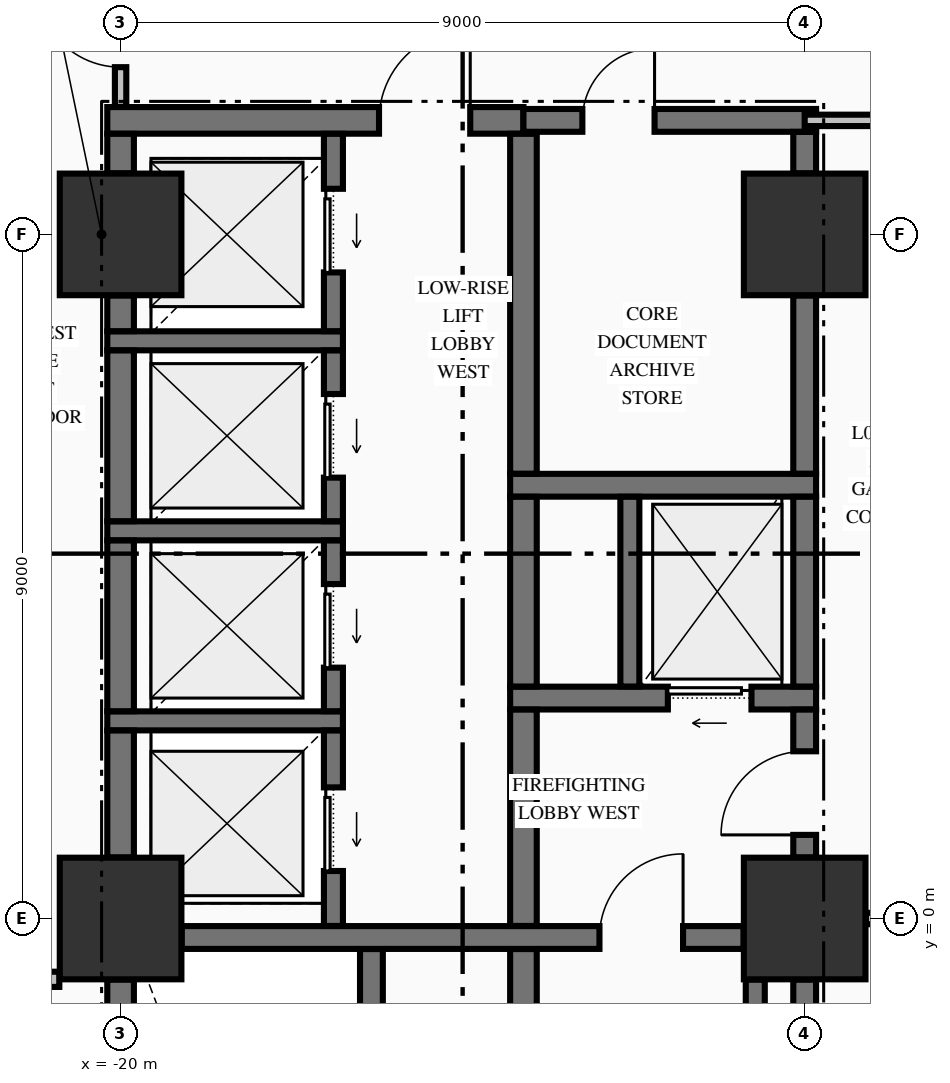
"""IFC4 building model, lengths in metres.
Left out: names, types, materials, properties, quantities, classifications, styles, units other than length and angle.
Written with IfcOpenShell. Run it as: python <this file> out.ifc"""

import sys

from ifc_helpers import new_model, si_unit, direction, frame, frame_2d, origin, origin_2d, place, context, subcontext, project, spatial, rectangle, extrude, element, fill, save


model = new_model("IFC4")
c1 = context("Model", 3, precision=1e-05, world=origin(), true_north=direction((0.0, 1.0)))
c2 = subcontext(c1, "Body", "Model", "MODEL_VIEW")
j1 = project(units=[si_unit("LENGTHUNIT", "METRE"), si_unit("PLANEANGLEUNIT", "RADIAN")], contexts=[c1])
p1 = place(None, origin())
s1 = spatial("IfcSite", under=j1, at=p1, CompositionType="ELEMENT")
p2 = place(p1, origin())
s2 = spatial("IfcBuilding", under=s1, at=p2, CompositionType="ELEMENT")
p3 = place(p2, origin())
s3 = spatial("IfcBuildingStorey", under=s2, at=p3, CompositionType="ELEMENT", Elevation=0.0)
for number, where, z_axis, x_axis in (
    (1, (-20.0, 0.0, 0.0), (0.0, 0.0, 1.0), (1.0, 0.0, 0.0)),
    (2, (-20.0, 9.0, 0.0), (0.0, 0.0, 1.0), (1.0, 0.0, 0.0)),
    (3, (-11.0, 0.0, 0.0), (0.0, 0.0, 1.0), (1.0, 0.0, 0.0)),
    (4, (-11.0, 9.0, 0.0), (0.0, 0.0, 1.0), (1.0, 0.0, 0.0)),
):
    element("IfcColumn", number, at=place(p3, frame(where, z_axis=z_axis, x_axis=x_axis)), inside=s3, PredefinedType="COLUMN", context=c2, shape_type="SweptSolid", body=[
        extrude(rectangle(XDim=1.6, YDim=1.6, at=origin_2d()), origin(), (0.0, 0.0, 1.0), 5.09),
    ])
p4 = place(p3, frame((-19.196, -0.25, 0.0), z_axis=(0.0, 0.0, 1.0), x_axis=(1.0, 0.0, 0.0)))
e5 = element("IfcWall", 5, at=p4, inside=s3, PredefinedType="SHEAR", context=c2, shape_type="SweptSolid", body=[
    extrude(rectangle(XDim=7.392, YDim=0.3, at=frame_2d((3.696, 0.0))), origin(), (0.0, 0.0, 1.0), 5.09),
])
p5 = place(p4, frame((5.496, 0.0, 0.0)))
e6 = element("IfcOpeningElement", 6, at=p5, cuts=e5, PredefinedType="OPENING", context=c2, shape_type="SweptSolid", body=[
    extrude(rectangle(XDim=1.1, YDim=2.15, at=frame_2d((0.55, 1.075))), frame((0.0, 0.16, 0.0), z_axis=(0.0, -1.0, 0.0), x_axis=(1.0, 0.0, 0.0)), (0.0, 0.0, 1.0), 0.32),
])
p6 = place(p3, frame((-20.175, 2.6, 0.0), z_axis=(0.0, 0.0, 1.0), x_axis=(1.0, 0.0, 0.0)))
e7 = element("IfcWall", 7, at=p6, inside=s3, PredefinedType="SOLIDWALL", context=c2, shape_type="SweptSolid", body=[
    extrude(rectangle(XDim=3.1, YDim=0.25, at=frame_2d((1.55, 0.0))), origin(), (0.0, 0.0, 1.0), 5.09),
])
p7 = place(p3, frame((-14.875, 2.9, 0.0), z_axis=(0.0, 0.0, 1.0), x_axis=(1.0, 0.0, 0.0)))
e8 = element("IfcWall", 8, at=p7, inside=s3, PredefinedType="SHEAR", context=c2, shape_type="SweptSolid", body=[
    extrude(rectangle(XDim=4.025, YDim=0.3, at=frame_2d((2.012, 0.0))), origin(), (0.0, 0.0, 1.0), 5.09),
])
p8 = place(p7, frame((2.075, 0.0, 0.0)))
e9 = element("IfcOpeningElement", 9, at=p8, cuts=e8, PredefinedType="OPENING", context=c2, shape_type="SweptSolid", body=[
    extrude(rectangle(XDim=1.1, YDim=2.2, at=frame_2d((0.55, 1.1))), frame((0.0, 0.16, 0.0), z_axis=(0.0, -1.0, 0.0), x_axis=(1.0, 0.0, 0.0)), (0.0, 0.0, 1.0), 0.32),
])
p9 = place(p3, frame((-20.175, 5.1, 0.0), z_axis=(0.0, 0.0, 1.0), x_axis=(1.0, 0.0, 0.0)))
e10 = element("IfcWall", 10, at=p9, inside=s3, PredefinedType="SOLIDWALL", context=c2, shape_type="SweptSolid", body=[
    extrude(rectangle(XDim=3.1, YDim=0.25, at=frame_2d((1.55, 0.0))), origin(), (0.0, 0.0, 1.0), 5.09),
])
p10 = place(p3, frame((-14.875, 5.7, 0.0), z_axis=(0.0, 0.0, 1.0), x_axis=(1.0, 0.0, 0.0)))
e11 = element("IfcWall", 11, at=p10, inside=s3, PredefinedType="SHEAR", context=c2, shape_type="SweptSolid", body=[
    extrude(rectangle(XDim=4.025, YDim=0.3, at=frame_2d((2.012, 0.0))), origin(), (0.0, 0.0, 1.0), 5.09),
])
p11 = place(p3, frame((-20.175, 7.6, 0.0), z_axis=(0.0, 0.0, 1.0), x_axis=(1.0, 0.0, 0.0)))
e12 = element("IfcWall", 12, at=p11, inside=s3, PredefinedType="SOLIDWALL", context=c2, shape_type="SweptSolid", body=[
    extrude(rectangle(XDim=3.1, YDim=0.25, at=frame_2d((1.55, 0.0))), origin(), (0.0, 0.0, 1.0), 5.09),
])
p12 = place(p3, frame((-20.175, 10.5, 0.0), z_axis=(0.0, 0.0, 1.0), x_axis=(1.0, 0.0, 0.0)))
e13 = element("IfcWall", 13, at=p12, inside=s3, PredefinedType="SHEAR", context=c2, shape_type="SweptSolid", body=[
    extrude(rectangle(XDim=5.475, YDim=0.35, at=frame_2d((2.738, 0.0))), origin(), (0.0, 0.0, 1.0), 5.09),
])
p13 = place(p12, frame((3.575, 0.0, 0.0)))
e14 = element("IfcOpeningElement", 14, at=p13, cuts=e13, PredefinedType="OPENING", context=c2, shape_type="SweptSolid", body=[
    extrude(rectangle(XDim=1.2, YDim=2.15, at=frame_2d((0.6, 1.075))), frame((0.0, 0.185, 0.0), z_axis=(0.0, -1.0, 0.0), x_axis=(1.0, 0.0, 0.0)), (0.0, 0.0, 1.0), 0.37),
])
p14 = place(p3, frame((-14.7, 10.5, 0.0), z_axis=(0.0, 0.0, 1.0), x_axis=(1.0, 0.0, 0.0)))
e15 = element("IfcWall", 15, at=p14, inside=s3, PredefinedType="SHEAR", context=c2, shape_type="SweptSolid", body=[
    extrude(rectangle(XDim=3.85, YDim=0.3, at=frame_2d((1.925, 0.0))), origin(), (0.0, 0.0, 1.0), 5.09),
])
p15 = place(p14, frame((0.775, 0.0, 0.0)))
e16 = element("IfcOpeningElement", 16, at=p15, cuts=e15, PredefinedType="OPENING", context=c2, shape_type="SweptSolid", body=[
    extrude(rectangle(XDim=0.95, YDim=2.15, at=frame_2d((0.475, 1.075))), frame((0.0, 0.16, 0.0), z_axis=(0.0, -1.0, 0.0), x_axis=(1.0, 0.0, 0.0)), (0.0, 0.0, 1.0), 0.32),
])
p16 = place(p3, frame((-22.475, -0.8, 0.0), z_axis=(0.0, 0.0, 1.0), x_axis=(1.0, 0.0, 0.0)))
e17 = element("IfcWall", 17, at=p16, inside=s3, PredefinedType="PARTITIONING", context=c2, shape_type="SweptSolid", body=[
    extrude(rectangle(XDim=1.669, YDim=0.2, at=frame_2d((0.834, 0.0))), origin(), (0.0, 0.0, 1.0), 5.09),
])
p17 = place(p16, frame((0.425, 0.0, 0.0)))
e18 = element("IfcOpeningElement", 18, at=p17, cuts=e17, PredefinedType="OPENING", context=c2, shape_type="SweptSolid", body=[
    extrude(rectangle(XDim=1.0, YDim=2.15, at=frame_2d((0.5, 1.075))), frame((0.0, 0.11, 0.0), z_axis=(0.0, -1.0, 0.0), x_axis=(1.0, 0.0, 0.0)), (0.0, 0.0, 1.0), 0.22),
])
p18 = place(p3, frame((-10.194, 0.0, 0.0), z_axis=(0.0, 0.0, 1.0), x_axis=(1.0, 0.0, 0.0)))
e19 = element("IfcWall", 19, at=p18, inside=s3, PredefinedType="PARTITIONING", context=c2, shape_type="SweptSolid", body=[
    extrude(rectangle(XDim=0.988, YDim=0.15, at=frame_2d((0.494, 0.0))), origin(), (0.0, 0.0, 1.0), 4.132),
])
p19 = place(p3, frame((-11.0, 10.5, 0.0), z_axis=(0.0, 0.0, 1.0), x_axis=(1.0, 0.0, 0.0)))
e20 = element("IfcWall", 20, at=p19, inside=s3, PredefinedType="PARTITIONING", context=c2, shape_type="SweptSolid", body=[
    extrude(rectangle(XDim=2.235, YDim=0.15, at=frame_2d((1.118, 0.0))), origin(), (0.0, 0.0, 1.0), 5.09),
])
p20 = place(p19, frame((0.97, 0.0, 0.0)))
e21 = element("IfcOpeningElement", 21, at=p20, cuts=e20, PredefinedType="OPENING", context=c2, shape_type="SweptSolid", body=[
    extrude(rectangle(XDim=1.1, YDim=2.15, at=frame_2d((0.55, 1.075))), frame((0.0, 0.085, 0.0), z_axis=(0.0, -1.0, 0.0), x_axis=(1.0, 0.0, 0.0)), (0.0, 0.0, 1.0), 0.17),
])
p21 = place(p3, frame((-20.0, -8.196, 0.0), z_axis=(0.0, 0.0, 1.0), x_axis=(0.0, 1.0, 0.0)))
e22 = element("IfcWall", 22, at=p21, inside=s3, PredefinedType="SHEAR", context=c2, shape_type="SweptSolid", body=[
    extrude(rectangle(XDim=7.392, YDim=0.35, at=frame_2d((3.696, 0.0))), origin(), (0.0, 0.0, 1.0), 5.09),
])
p22 = place(p3, frame((-20.0, 0.804, 0.0), z_axis=(0.0, 0.0, 1.0), x_axis=(0.0, 1.0, 0.0)))
e23 = element("IfcWall", 23, at=p22, inside=s3, PredefinedType="SHEAR", context=c2, shape_type="SweptSolid", body=[
    extrude(rectangle(XDim=1.669, YDim=0.35, at=frame_2d((0.834, 0.0))), origin(), (0.0, 0.0, 1.0), 5.09),
])
for number, where, z_axis, x_axis in (
    (24, (-20.0, 2.727, 0.0), (0.0, 0.0, 1.0), (0.0, 1.0, 0.0)),
    (25, (-20.0, 5.227, 0.0), (0.0, 0.0, 1.0), (0.0, 1.0, 0.0)),
):
    element("IfcWall", number, at=place(p3, frame(where, z_axis=z_axis, x_axis=x_axis)), inside=s3, PredefinedType="SHEAR", context=c2, shape_type="SweptSolid", body=[
        extrude(rectangle(XDim=2.246, YDim=0.35, at=frame_2d((1.123, 0.0))), origin(), (0.0, 0.0, 1.0), 5.09),
    ])
p23 = place(p3, frame((-20.0, 7.727, 0.0), z_axis=(0.0, 0.0, 1.0), x_axis=(0.0, 1.0, 0.0)))
e26 = element("IfcWall", 26, at=p23, inside=s3, PredefinedType="SHEAR", context=c2, shape_type="SweptSolid", body=[
    extrude(rectangle(XDim=0.469, YDim=0.35, at=frame_2d((0.234, 0.0))), origin(), (0.0, 0.0, 1.0), 5.09),
])
p24 = place(p3, frame((-20.0, 9.804, 0.0), z_axis=(0.0, 0.0, 1.0), x_axis=(0.0, 1.0, 0.0)))
e27 = element("IfcWall", 27, at=p24, inside=s3, PredefinedType="SHEAR", context=c2, shape_type="SweptSolid", body=[
    extrude(rectangle(XDim=0.519, YDim=0.35, at=frame_2d((0.26, 0.0))), origin(), (0.0, 0.0, 1.0), 5.09),
])
p25 = place(p3, frame((-17.2, -0.098, 0.0), z_axis=(0.0, 0.0, 1.0), x_axis=(0.0, 1.0, 0.0)))
e28 = element("IfcWall", 28, at=p25, inside=s3, PredefinedType="SOLIDWALL", context=c2, shape_type="SweptSolid", body=[
    extrude(rectangle(XDim=2.571, YDim=0.25, at=frame_2d((1.285, 0.0))), origin(), (0.0, 0.0, 1.0), 5.09),
])
p26 = place(p25, frame((0.723, 0.0, 0.0)))
e29 = element("IfcOpeningElement", 29, at=p26, cuts=e28, PredefinedType="OPENING", context=c2, shape_type="SweptSolid", body=[
    extrude(rectangle(XDim=1.1, YDim=2.2, at=frame_2d((0.55, 1.1))), frame((0.0, 0.135, 0.0), z_axis=(0.0, -1.0, 0.0), x_axis=(1.0, 0.0, 0.0)), (0.0, 0.0, 1.0), 0.27),
])
p27 = place(p3, frame((-17.2, 2.727, 0.0), z_axis=(0.0, 0.0, 1.0), x_axis=(0.0, 1.0, 0.0)))
e30 = element("IfcWall", 30, at=p27, inside=s3, PredefinedType="SOLIDWALL", context=c2, shape_type="SweptSolid", body=[
    extrude(rectangle(XDim=2.246, YDim=0.25, at=frame_2d((1.123, 0.0))), origin(), (0.0, 0.0, 1.0), 5.09),
])
p28 = place(p27, frame((0.573, 0.0, 0.0)))
e31 = element("IfcOpeningElement", 31, at=p28, cuts=e30, PredefinedType="OPENING", context=c2, shape_type="SweptSolid", body=[
    extrude(rectangle(XDim=1.1, YDim=2.2, at=frame_2d((0.55, 1.1))), frame((0.0, 0.135, 0.0), z_axis=(0.0, -1.0, 0.0), x_axis=(1.0, 0.0, 0.0)), (0.0, 0.0, 1.0), 0.27),
])
p29 = place(p3, frame((-17.2, 5.227, 0.0), z_axis=(0.0, 0.0, 1.0), x_axis=(0.0, 1.0, 0.0)))
e32 = element("IfcWall", 32, at=p29, inside=s3, PredefinedType="SOLIDWALL", context=c2, shape_type="SweptSolid", body=[
    extrude(rectangle(XDim=2.246, YDim=0.25, at=frame_2d((1.123, 0.0))), origin(), (0.0, 0.0, 1.0), 5.09),
])
p30 = place(p29, frame((0.573, 0.0, 0.0)))
e33 = element("IfcOpeningElement", 33, at=p30, cuts=e32, PredefinedType="OPENING", context=c2, shape_type="SweptSolid", body=[
    extrude(rectangle(XDim=1.1, YDim=2.2, at=frame_2d((0.55, 1.1))), frame((0.0, 0.135, 0.0), z_axis=(0.0, -1.0, 0.0), x_axis=(1.0, 0.0, 0.0)), (0.0, 0.0, 1.0), 0.27),
])
p31 = place(p3, frame((-17.2, 7.727, 0.0), z_axis=(0.0, 0.0, 1.0), x_axis=(0.0, 1.0, 0.0)))
e34 = element("IfcWall", 34, at=p31, inside=s3, PredefinedType="SOLIDWALL", context=c2, shape_type="SweptSolid", body=[
    extrude(rectangle(XDim=2.596, YDim=0.25, at=frame_2d((1.298, 0.0))), origin(), (0.0, 0.0, 1.0), 5.09),
])
p32 = place(p31, frame((0.773, 0.0, 0.0)))
e35 = element("IfcOpeningElement", 35, at=p32, cuts=e34, PredefinedType="OPENING", context=c2, shape_type="SweptSolid", body=[
    extrude(rectangle(XDim=1.1, YDim=2.2, at=frame_2d((0.55, 1.1))), frame((0.0, 0.135, 0.0), z_axis=(0.0, -1.0, 0.0), x_axis=(1.0, 0.0, 0.0)), (0.0, 0.0, 1.0), 0.27),
])
p33 = place(p3, frame((-16.7, -9.773, 0.0), z_axis=(0.0, 0.0, 1.0), x_axis=(0.0, 1.0, 0.0)))
e36 = element("IfcWall", 36, at=p33, inside=s3, PredefinedType="SHEAR", context=c2, shape_type="SweptSolid", body=[
    extrude(rectangle(XDim=9.371, YDim=0.3, at=frame_2d((4.686, 0.0))), origin(), (0.0, 0.0, 1.0), 5.09),
])
p34 = place(p3, frame((-14.7, -9.773, 0.0), z_axis=(0.0, 0.0, 1.0), x_axis=(0.0, 1.0, 0.0)))
e37 = element("IfcWall", 37, at=p34, inside=s3, PredefinedType="SHEAR", context=c2, shape_type="SweptSolid", body=[
    extrude(rectangle(XDim=9.371, YDim=0.35, at=frame_2d((4.686, 0.0))), origin(), (0.0, 0.0, 1.0), 5.09),
])
p35 = place(p3, frame((-14.7, -0.098, 0.0), z_axis=(0.0, 0.0, 1.0), x_axis=(0.0, 1.0, 0.0)))
e38 = element("IfcWall", 38, at=p35, inside=s3, PredefinedType="SHEAR", context=c2, shape_type="SweptSolid", body=[
    extrude(rectangle(XDim=2.846, YDim=0.35, at=frame_2d((1.423, 0.0))), origin(), (0.0, 0.0, 1.0), 5.09),
])
p36 = place(p3, frame((-14.7, 3.052, 0.0), z_axis=(0.0, 0.0, 1.0), x_axis=(0.0, 1.0, 0.0)))
e39 = element("IfcWall", 39, at=p36, inside=s3, PredefinedType="SHEAR", context=c2, shape_type="SweptSolid", body=[
    extrude(rectangle(XDim=2.496, YDim=0.35, at=frame_2d((1.248, 0.0))), origin(), (0.0, 0.0, 1.0), 5.09),
])
p37 = place(p3, frame((-14.7, 5.852, 0.0), z_axis=(0.0, 0.0, 1.0), x_axis=(0.0, 1.0, 0.0)))
e40 = element("IfcWall", 40, at=p37, inside=s3, PredefinedType="SHEAR", context=c2, shape_type="SweptSolid", body=[
    extrude(rectangle(XDim=4.471, YDim=0.35, at=frame_2d((2.235, 0.0))), origin(), (0.0, 0.0, 1.0), 5.09),
])
p38 = place(p3, frame((-13.3, 3.052, 0.0), z_axis=(0.0, 0.0, 1.0), x_axis=(0.0, 1.0, 0.0)))
e41 = element("IfcWall", 41, at=p38, inside=s3, PredefinedType="SOLIDWALL", context=c2, shape_type="SweptSolid", body=[
    extrude(rectangle(XDim=2.496, YDim=0.25, at=frame_2d((1.248, 0.0))), origin(), (0.0, 0.0, 1.0), 5.09),
])
p39 = place(p3, frame((-11.65, -8.196, 0.0), z_axis=(0.0, 0.0, 1.0), x_axis=(0.0, 1.0, 0.0)))
e42 = element("IfcWall", 42, at=p39, inside=s3, PredefinedType="SOLIDWALL", context=c2, shape_type="SweptSolid", body=[
    extrude(rectangle(XDim=7.392, YDim=0.25, at=frame_2d((3.696, 0.0))), origin(), (0.0, 0.0, 1.0), 5.09),
])
p40 = place(p3, frame((-11.0, -8.196, 0.0), z_axis=(0.0, 0.0, 1.0), x_axis=(0.0, 1.0, 0.0)))
e43 = element("IfcWall", 43, at=p40, inside=s3, PredefinedType="SHEAR", context=c2, shape_type="SweptSolid", body=[
    extrude(rectangle(XDim=7.392, YDim=0.3, at=frame_2d((3.696, 0.0))), origin(), (0.0, 0.0, 1.0), 5.09),
])
p41 = place(p3, frame((-11.0, 0.804, 0.0), z_axis=(0.0, 0.0, 1.0), x_axis=(0.0, 1.0, 0.0)))
e44 = element("IfcWall", 44, at=p41, inside=s3, PredefinedType="SHEAR", context=c2, shape_type="SweptSolid", body=[
    extrude(rectangle(XDim=1.944, YDim=0.3, at=frame_2d((0.972, 0.0))), origin(), (0.0, 0.0, 1.0), 5.09),
])
p42 = place(p41, frame((0.296, 0.0, 0.0)))
e45 = element("IfcOpeningElement", 45, at=p42, cuts=e44, PredefinedType="OPENING", context=c2, shape_type="SweptSolid", body=[
    extrude(rectangle(XDim=1.1, YDim=2.15, at=frame_2d((0.55, 1.075))), frame((0.0, 0.16, 0.0), z_axis=(0.0, -1.0, 0.0), x_axis=(1.0, 0.0, 0.0)), (0.0, 0.0, 1.0), 0.32),
])
p43 = place(p3, frame((-11.0, 3.052, 0.0), z_axis=(0.0, 0.0, 1.0), x_axis=(0.0, 1.0, 0.0)))
e46 = element("IfcWall", 46, at=p43, inside=s3, PredefinedType="SHEAR", context=c2, shape_type="SweptSolid", body=[
    extrude(rectangle(XDim=2.496, YDim=0.3, at=frame_2d((1.248, 0.0))), origin(), (0.0, 0.0, 1.0), 5.09),
])
p44 = place(p3, frame((-11.0, 5.852, 0.0), z_axis=(0.0, 0.0, 1.0), x_axis=(0.0, 1.0, 0.0)))
e47 = element("IfcWall", 47, at=p44, inside=s3, PredefinedType="SHEAR", context=c2, shape_type="SweptSolid", body=[
    extrude(rectangle(XDim=2.344, YDim=0.3, at=frame_2d((1.172, 0.0))), origin(), (0.0, 0.0, 1.0), 5.09),
])
p45 = place(p3, frame((-11.0, 9.804, 0.0), z_axis=(0.0, 0.0, 1.0), x_axis=(0.0, 1.0, 0.0)))
e48 = element("IfcWall", 48, at=p45, inside=s3, PredefinedType="SHEAR", context=c2, shape_type="SweptSolid", body=[
    extrude(rectangle(XDim=0.544, YDim=0.3, at=frame_2d((0.272, 0.0))), origin(), (0.0, 0.0, 1.0), 5.09),
])
p46 = place(p3, frame((-20.0, 10.678, 0.0), z_axis=(0.0, 0.0, 1.0), x_axis=(0.0, 1.0, 0.0)))
e49 = element("IfcWall", 49, at=p46, inside=s3, PredefinedType="PARTITIONING", context=c2, shape_type="SweptSolid", body=[
    extrude(rectangle(XDim=2.244, YDim=0.15, at=frame_2d((1.122, 0.0))), origin(), (0.0, 0.0, 1.0), 4.132),
])
p47 = place(p46, frame((0.522, 0.0, 0.0)))
e50 = element("IfcOpeningElement", 50, at=p47, cuts=e49, PredefinedType="OPENING", context=c2, shape_type="SweptSolid", body=[
    extrude(rectangle(XDim=1.1, YDim=2.15, at=frame_2d((0.55, 1.075))), frame((0.0, 0.085, 0.0), z_axis=(0.0, -1.0, 0.0), x_axis=(1.0, 0.0, 0.0)), (0.0, 0.0, 1.0), 0.17),
])
p48 = place(p5, origin())
e51 = element("IfcDoor", 51, at=p48, inside=s3, OperationType="SINGLE_SWING_RIGHT", PredefinedType="DOOR", context=c2, shape_type="SweptSolid", body=[
    extrude(rectangle(XDim=1.1, YDim=2.15, at=frame_2d((0.55, 1.075))), frame((0.0, 0.025, 0.0), z_axis=(0.0, -1.0, 0.0), x_axis=(1.0, 0.0, 0.0)), (0.0, 0.0, 1.0), 0.05),
])
fill(e6, e51)
p49 = place(p42, origin())
e52 = element("IfcDoor", 52, at=p49, inside=s3, OperationType="SINGLE_SWING_LEFT", PredefinedType="DOOR", context=c2, shape_type="SweptSolid", body=[
    extrude(rectangle(XDim=1.1, YDim=2.15, at=frame_2d((0.55, 1.075))), frame((0.0, 0.025, 0.0), z_axis=(0.0, -1.0, 0.0), x_axis=(1.0, 0.0, 0.0)), (0.0, 0.0, 1.0), 0.05),
])
fill(e45, e52)
p50 = place(p8, origin())
e53 = element("IfcDoor", 53, at=p50, inside=s3, OperationType="SLIDING_TO_LEFT", PredefinedType="DOOR", context=c2, shape_type="SweptSolid", body=[
    extrude(rectangle(XDim=1.1, YDim=2.2, at=frame_2d((0.55, 1.1))), frame((0.0, 0.025, 0.0), z_axis=(0.0, -1.0, 0.0), x_axis=(1.0, 0.0, 0.0)), (0.0, 0.0, 1.0), 0.05),
])
fill(e9, e53)
p51 = place(p15, origin())
e54 = element("IfcDoor", 54, at=p51, inside=s3, OperationType="SINGLE_SWING_RIGHT", PredefinedType="DOOR", context=c2, shape_type="SweptSolid", body=[
    extrude(rectangle(XDim=0.95, YDim=2.15, at=frame_2d((0.475, 1.075))), frame((0.0, 0.025, 0.0), z_axis=(0.0, -1.0, 0.0), x_axis=(1.0, 0.0, 0.0)), (0.0, 0.0, 1.0), 0.05),
])
fill(e16, e54)
p52 = place(p13, origin())
e55 = element("IfcDoor", 55, at=p52, inside=s3, OperationType="SINGLE_SWING_RIGHT", PredefinedType="DOOR", context=c2, shape_type="SweptSolid", body=[
    extrude(rectangle(XDim=1.2, YDim=2.15, at=frame_2d((0.6, 1.075))), frame((0.0, 0.025, 0.0), z_axis=(0.0, -1.0, 0.0), x_axis=(1.0, 0.0, 0.0)), (0.0, 0.0, 1.0), 0.05),
])
fill(e14, e55)
p53 = place(p26, origin())
e56 = element("IfcDoor", 56, at=p53, inside=s3, OperationType="SLIDING_TO_LEFT", PredefinedType="DOOR", context=c2, shape_type="SweptSolid", body=[
    extrude(rectangle(XDim=1.1, YDim=2.2, at=frame_2d((0.55, 1.1))), frame((0.0, 0.025, 0.0), z_axis=(0.0, -1.0, 0.0), x_axis=(1.0, 0.0, 0.0)), (0.0, 0.0, 1.0), 0.05),
])
fill(e29, e56)
p54 = place(p28, origin())
e57 = element("IfcDoor", 57, at=p54, inside=s3, OperationType="SLIDING_TO_LEFT", PredefinedType="DOOR", context=c2, shape_type="SweptSolid", body=[
    extrude(rectangle(XDim=1.1, YDim=2.2, at=frame_2d((0.55, 1.1))), frame((0.0, 0.025, 0.0), z_axis=(0.0, -1.0, 0.0), x_axis=(1.0, 0.0, 0.0)), (0.0, 0.0, 1.0), 0.05),
])
fill(e31, e57)
p55 = place(p30, origin())
e58 = element("IfcDoor", 58, at=p55, inside=s3, OperationType="SLIDING_TO_LEFT", PredefinedType="DOOR", context=c2, shape_type="SweptSolid", body=[
    extrude(rectangle(XDim=1.1, YDim=2.2, at=frame_2d((0.55, 1.1))), frame((0.0, 0.025, 0.0), z_axis=(0.0, -1.0, 0.0), x_axis=(1.0, 0.0, 0.0)), (0.0, 0.0, 1.0), 0.05),
])
fill(e33, e58)
p56 = place(p32, origin())
e59 = element("IfcDoor", 59, at=p56, inside=s3, OperationType="SLIDING_TO_LEFT", PredefinedType="DOOR", context=c2, shape_type="SweptSolid", body=[
    extrude(rectangle(XDim=1.1, YDim=2.2, at=frame_2d((0.55, 1.1))), frame((0.0, 0.025, 0.0), z_axis=(0.0, -1.0, 0.0), x_axis=(1.0, 0.0, 0.0)), (0.0, 0.0, 1.0), 0.05),
])
fill(e35, e59)
p57 = place(p47, origin())
e60 = element("IfcDoor", 60, at=p57, inside=s3, OperationType="SINGLE_SWING_RIGHT", PredefinedType="DOOR", context=c2, shape_type="SweptSolid", body=[
    extrude(rectangle(XDim=1.1, YDim=2.15, at=frame_2d((0.55, 1.075))), frame((0.0, 0.025, 0.0), z_axis=(0.0, -1.0, 0.0), x_axis=(1.0, 0.0, 0.0)), (0.0, 0.0, 1.0), 0.05),
])
fill(e50, e60)
save(model, sys.argv[1])
